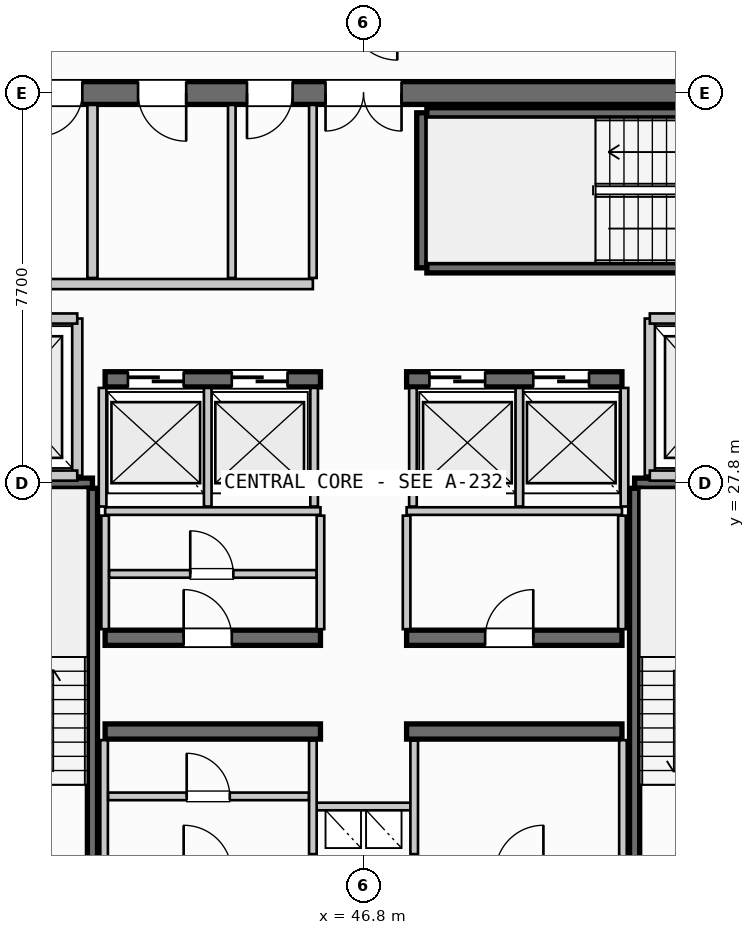
"""IFC4 building model, lengths in metres.
Left out: names, types, materials, properties, quantities, classifications, styles, units other than length and angle.
Written with IfcOpenShell. Run it as: python <this file> out.ifc"""

import sys

from ifc_helpers import new_model, si_unit, direction, frame, frame_2d, origin, place, context, subcontext, project, spatial, rectangle, extrude, source, transform, mapped, element, fill, save


model = new_model("IFC4")
c1 = context("Model", 3, precision=1e-05, world=origin(), true_north=direction((0.0, 1.0)))
c2 = subcontext(c1, "Body", "Model", "MODEL_VIEW")
j1 = project(units=[si_unit("LENGTHUNIT", "METRE"), si_unit("PLANEANGLEUNIT", "RADIAN")], contexts=[c1])
p1 = place(None, origin())
s1 = spatial("IfcSite", under=j1, at=p1, CompositionType="ELEMENT")
p2 = place(p1, origin())
s2 = spatial("IfcBuilding", under=s1, at=p2, CompositionType="ELEMENT")
p3 = place(p2, frame((0.0, 0.0, 231.85)))
s3 = spatial("IfcBuildingStorey", under=s2, at=p3, CompositionType="ELEMENT", Elevation=231.85)
p4 = place(p3, frame((55.6, 35.5, 0.0), z_axis=(0.0, 0.0, 1.0), x_axis=(-1.0, 0.0, 0.0)))
e1 = element("IfcWall", 1, at=p4, inside=s3, PredefinedType="SHEAR", context=c2, shape_type="SweptSolid", body=[
    extrude(rectangle(XDim=17.6, YDim=0.45, at=frame_2d((8.8, 0.0))), origin(), (0.0, 0.0, 1.0), 3.21),
])
p5 = place(p4, frame((8.05, 0.0, 0.0)))
e2 = element("IfcOpeningElement", 2, at=p5, cuts=e1, PredefinedType="OPENING", context=c2, shape_type="SweptSolid", body=[
    extrude(rectangle(XDim=1.5, YDim=2.2, at=frame_2d((0.75, 1.1))), frame((0.0, 0.235, 0.0), z_axis=(0.0, -1.0, 0.0), x_axis=(1.0, 0.0, 0.0)), (0.0, 0.0, 1.0), 0.47),
])
p6 = place(p4, frame((15.85, 0.0, 0.0)))
e3 = element("IfcOpeningElement", 3, at=p6, cuts=e1, PredefinedType="OPENING", context=c2, shape_type="SweptSolid", body=[
    extrude(rectangle(XDim=0.85, YDim=2.15, at=frame_2d((0.425, 1.075))), frame((0.0, 0.235, 0.0), z_axis=(0.0, -1.0, 0.0), x_axis=(1.0, 0.0, 0.0)), (0.0, 0.0, 1.0), 0.47),
])
p7 = place(p4, frame((14.35, 0.0, 0.0)))
e4 = element("IfcOpeningElement", 4, at=p7, cuts=e1, PredefinedType="OPENING", context=c2, shape_type="SweptSolid", body=[
    extrude(rectangle(XDim=0.85, YDim=2.15, at=frame_2d((0.425, 1.075))), frame((0.0, 0.235, 0.0), z_axis=(0.0, -1.0, 0.0), x_axis=(1.0, 0.0, 0.0)), (0.0, 0.0, 1.0), 0.47),
])
p8 = place(p4, frame((12.3, 0.0, 0.0)))
e5 = element("IfcOpeningElement", 5, at=p8, cuts=e1, PredefinedType="OPENING", context=c2, shape_type="SweptSolid", body=[
    extrude(rectangle(XDim=0.95, YDim=2.15, at=frame_2d((0.475, 1.075))), frame((0.0, 0.235, 0.0), z_axis=(0.0, -1.0, 0.0), x_axis=(1.0, 0.0, 0.0)), (0.0, 0.0, 1.0), 0.47),
])
p9 = place(p4, frame((10.2, 0.0, 0.0)))
e6 = element("IfcOpeningElement", 6, at=p9, cuts=e1, PredefinedType="OPENING", context=c2, shape_type="SweptSolid", body=[
    extrude(rectangle(XDim=0.9, YDim=2.15, at=frame_2d((0.45, 1.075))), frame((0.0, 0.235, 0.0), z_axis=(0.0, -1.0, 0.0), x_axis=(1.0, 0.0, 0.0)), (0.0, 0.0, 1.0), 0.47),
])
for number, where, z_axis, x_axis in (
    (7, (41.7, 22.9, 0.0), (0.0, 0.0, 1.0), (1.0, 0.0, 0.0)),
    (8, (47.65, 22.9, 0.0), (0.0, 0.0, 1.0), (1.0, 0.0, 0.0)),
):
    element("IfcWall", number, at=place(p3, frame(where, z_axis=z_axis, x_axis=x_axis)), inside=s3, PredefinedType="SHEAR", context=c2, shape_type="SweptSolid", body=[
        extrude(rectangle(XDim=4.25, YDim=0.3, at=frame_2d((2.125, 0.0))), origin(), (0.0, 0.0, 1.0), 3.21),
    ])
p10 = place(p3, frame((41.7, 24.75, 0.0), z_axis=(0.0, 0.0, 1.0), x_axis=(1.0, 0.0, 0.0)))
e9 = element("IfcWall", 9, at=p10, inside=s3, PredefinedType="SHEAR", context=c2, shape_type="SweptSolid", body=[
    extrude(rectangle(XDim=4.25, YDim=0.3, at=frame_2d((2.125, 0.0))), origin(), (0.0, 0.0, 1.0), 3.21),
])
p11 = place(p10, frame((1.55, 0.0, 0.0)))
e10 = element("IfcOpeningElement", 10, at=p11, cuts=e9, PredefinedType="OPENING", context=c2, shape_type="SweptSolid", body=[
    extrude(rectangle(XDim=0.95, YDim=2.15, at=frame_2d((0.475, 1.075))), frame((0.0, 0.16, 0.0), z_axis=(0.0, -1.0, 0.0), x_axis=(1.0, 0.0, 0.0)), (0.0, 0.0, 1.0), 0.32),
])
p12 = place(p3, frame((47.65, 24.75, 0.0), z_axis=(0.0, 0.0, 1.0), x_axis=(1.0, 0.0, 0.0)))
e11 = element("IfcWall", 11, at=p12, inside=s3, PredefinedType="SHEAR", context=c2, shape_type="SweptSolid", body=[
    extrude(rectangle(XDim=4.25, YDim=0.3, at=frame_2d((2.125, 0.0))), origin(), (0.0, 0.0, 1.0), 3.21),
])
p13 = place(p12, frame((1.55, 0.0, 0.0)))
e12 = element("IfcOpeningElement", 12, at=p13, cuts=e11, PredefinedType="OPENING", context=c2, shape_type="SweptSolid", body=[
    extrude(rectangle(XDim=0.95, YDim=2.15, at=frame_2d((0.475, 1.075))), frame((0.0, 0.16, 0.0), z_axis=(0.0, -1.0, 0.0), x_axis=(1.0, 0.0, 0.0)), (0.0, 0.0, 1.0), 0.32),
])
p14 = place(p3, frame((41.7, 29.85, 0.0), z_axis=(0.0, 0.0, 1.0), x_axis=(1.0, 0.0, 0.0)))
e13 = element("IfcWall", 13, at=p14, inside=s3, PredefinedType="SHEAR", context=c2, shape_type="SweptSolid", body=[
    extrude(rectangle(XDim=4.25, YDim=0.3, at=frame_2d((2.125, 0.0))), origin(), (0.0, 0.0, 1.0), 3.21),
])
p15 = place(p14, frame((0.45, 0.0, 0.0)))
e14 = element("IfcOpeningElement", 14, at=p15, cuts=e13, PredefinedType="OPENING", context=c2, shape_type="SweptSolid", body=[
    extrude(rectangle(XDim=1.1, YDim=2.2, at=frame_2d((0.55, 1.1))), frame((0.0, 0.16, 0.0), z_axis=(0.0, -1.0, 0.0), x_axis=(1.0, 0.0, 0.0)), (0.0, 0.0, 1.0), 0.32),
])
p16 = place(p14, frame((2.5, 0.0, 0.0)))
e15 = element("IfcOpeningElement", 15, at=p16, cuts=e13, PredefinedType="OPENING", context=c2, shape_type="SweptSolid", body=[
    extrude(rectangle(XDim=1.1, YDim=2.2, at=frame_2d((0.55, 1.1))), frame((0.0, 0.16, 0.0), z_axis=(0.0, -1.0, 0.0), x_axis=(1.0, 0.0, 0.0)), (0.0, 0.0, 1.0), 0.32),
])
p17 = place(p3, frame((47.65, 29.85, 0.0), z_axis=(0.0, 0.0, 1.0), x_axis=(1.0, 0.0, 0.0)))
e16 = element("IfcWall", 16, at=p17, inside=s3, PredefinedType="SHEAR", context=c2, shape_type="SweptSolid", body=[
    extrude(rectangle(XDim=4.25, YDim=0.3, at=frame_2d((2.125, 0.0))), origin(), (0.0, 0.0, 1.0), 3.21),
])
p18 = place(p17, frame((0.45, 0.0, 0.0)))
e17 = element("IfcOpeningElement", 17, at=p18, cuts=e16, PredefinedType="OPENING", context=c2, shape_type="SweptSolid", body=[
    extrude(rectangle(XDim=1.1, YDim=2.2, at=frame_2d((0.55, 1.1))), frame((0.0, 0.16, 0.0), z_axis=(0.0, -1.0, 0.0), x_axis=(1.0, 0.0, 0.0)), (0.0, 0.0, 1.0), 0.32),
])
p19 = place(p17, frame((2.5, 0.0, 0.0)))
e18 = element("IfcOpeningElement", 18, at=p19, cuts=e16, PredefinedType="OPENING", context=c2, shape_type="SweptSolid", body=[
    extrude(rectangle(XDim=1.1, YDim=2.2, at=frame_2d((0.55, 1.1))), frame((0.0, 0.16, 0.0), z_axis=(0.0, -1.0, 0.0), x_axis=(1.0, 0.0, 0.0)), (0.0, 0.0, 1.0), 0.32),
])
p20 = place(p3, frame((38.39, 27.8, 0.0), z_axis=(0.0, 0.0, 1.0), x_axis=(1.0, 0.0, 0.0)))
e19 = element("IfcWall", 19, at=p20, inside=s3, PredefinedType="SHEAR", context=c2, shape_type="SweptSolid", body=[
    extrude(rectangle(XDim=3.06, YDim=0.2, at=frame_2d((1.53, 0.0))), origin(), (0.0, 0.0, 1.0), 3.21),
])
p21 = place(p3, frame((41.45, 27.7, 0.0), z_axis=(0.0, 0.0, 1.0), x_axis=(0.0, -1.0, 0.0)))
e20 = element("IfcWall", 20, at=p21, inside=s3, PredefinedType="SHEAR", context=c2, shape_type="SweptSolid", body=[
    extrude(rectangle(XDim=7.35, YDim=0.2, at=frame_2d((3.675, 0.0))), origin(), (0.0, 0.0, 1.0), 3.21),
])
p22 = place(p3, frame((52.15, 27.8, 0.0), z_axis=(0.0, 0.0, 1.0), x_axis=(1.0, 0.0, 0.0)))
e21 = element("IfcWall", 21, at=p22, inside=s3, PredefinedType="SHEAR", context=c2, shape_type="SweptSolid", body=[
    extrude(rectangle(XDim=3.06, YDim=0.2, at=frame_2d((1.53, 0.0))), origin(), (0.0, 0.0, 1.0), 3.21),
])
p23 = place(p3, frame((52.15, 20.35, 0.0), z_axis=(0.0, 0.0, 1.0), x_axis=(0.0, 1.0, 0.0)))
e22 = element("IfcWall", 22, at=p23, inside=s3, PredefinedType="SHEAR", context=c2, shape_type="SweptSolid", body=[
    extrude(rectangle(XDim=7.35, YDim=0.2, at=frame_2d((3.675, 0.0))), origin(), (0.0, 0.0, 1.0), 3.21),
])
p24 = place(p3, frame((47.95, 32.05, 0.0), z_axis=(0.0, 0.0, 1.0), x_axis=(0.0, 1.0, 0.0)))
e23 = element("IfcWall", 23, at=p24, inside=s3, PredefinedType="SHEAR", context=c2, shape_type="SweptSolid", body=[
    extrude(rectangle(XDim=3.06, YDim=0.2, at=frame_2d((1.53, 0.0))), origin(), (0.0, 0.0, 1.0), 3.21),
])
for number, where, z_axis, x_axis in (
    (24, (48.05, 35.11, 0.0), (0.0, 0.0, 1.0), (1.0, 0.0, 0.0)),
    (25, (55.4, 32.05, 0.0), (0.0, 0.0, 1.0), (-1.0, 0.0, 0.0)),
):
    element("IfcWall", number, at=place(p3, frame(where, z_axis=z_axis, x_axis=x_axis)), inside=s3, PredefinedType="SHEAR", context=c2, shape_type="SweptSolid", body=[
        extrude(rectangle(XDim=7.35, YDim=0.2, at=frame_2d((3.675, 0.0))), origin(), (0.0, 0.0, 1.0), 3.21),
    ])
p25 = place(p3, frame((45.8, 21.42, 0.0), z_axis=(0.0, 0.0, 1.0), x_axis=(1.0, 0.0, 0.0)))
e26 = element("IfcWall", 26, at=p25, inside=s3, PredefinedType="PARTITIONING", context=c2, shape_type="SweptSolid", body=[
    extrude(rectangle(XDim=2.0, YDim=0.15, at=frame_2d((1.0, 0.0))), origin(), (0.0, 0.0, 1.0), 2.28),
])
for number, where, z_axis, x_axis in (
    (27, (45.8, 20.48, 0.0), (0.0, 0.0, 1.0), (0.0, 1.0, 0.0)),
    (28, (47.8, 20.48, 0.0), (0.0, 0.0, 1.0), (0.0, 1.0, 0.0)),
):
    element("IfcWall", number, at=place(p3, frame(where, z_axis=z_axis, x_axis=x_axis)), inside=s3, PredefinedType="PARTITIONING", context=c2, shape_type="SweptSolid", body=[
        extrude(rectangle(XDim=2.24, YDim=0.15, at=frame_2d((1.12, 0.0))), origin(), (0.0, 0.0, 1.0), 2.28),
    ])
p26 = place(p3, frame((41.15, 27.95, 0.0), z_axis=(0.0, 0.0, 1.0), x_axis=(0.0, 1.0, 0.0)))
e29 = element("IfcWall", 29, at=p26, inside=s3, PredefinedType="PARTITIONING", context=c2, shape_type="SweptSolid", body=[
    extrude(rectangle(XDim=3.1, YDim=0.2, at=frame_2d((1.55, 0.0))), origin(), (0.0, 0.0, 1.0), 2.28),
])
for number, where, z_axis, x_axis in (
    (30, (38.235, 27.95, 0.0), (0.0, 0.0, 1.0), (1.0, 0.0, 0.0)),
    (31, (38.235, 31.05, 0.0), (0.0, 0.0, 1.0), (1.0, 0.0, 0.0)),
):
    element("IfcWall", number, at=place(p3, frame(where, z_axis=z_axis, x_axis=x_axis)), inside=s3, PredefinedType="PARTITIONING", context=c2, shape_type="SweptSolid", body=[
        extrude(rectangle(XDim=2.915, YDim=0.2, at=frame_2d((1.458, 0.0))), origin(), (0.0, 0.0, 1.0), 2.28),
    ])
p27 = place(p3, frame((52.45, 27.95, 0.0), z_axis=(0.0, 0.0, 1.0), x_axis=(0.0, 1.0, 0.0)))
e32 = element("IfcWall", 32, at=p27, inside=s3, PredefinedType="PARTITIONING", context=c2, shape_type="SweptSolid", body=[
    extrude(rectangle(XDim=3.1, YDim=0.2, at=frame_2d((1.55, 0.0))), origin(), (0.0, 0.0, 1.0), 2.28),
])
for number, where, z_axis, x_axis in (
    (33, (52.45, 27.95, 0.0), (0.0, 0.0, 1.0), (1.0, 0.0, 0.0)),
    (34, (52.45, 31.05, 0.0), (0.0, 0.0, 1.0), (1.0, 0.0, 0.0)),
):
    element("IfcWall", number, at=place(p3, frame(where, z_axis=z_axis, x_axis=x_axis)), inside=s3, PredefinedType="PARTITIONING", context=c2, shape_type="SweptSolid", body=[
        extrude(rectangle(XDim=2.915, YDim=0.2, at=frame_2d((1.458, 0.0))), origin(), (0.0, 0.0, 1.0), 2.28),
    ])
for number, where, z_axis, x_axis in (
    (35, (41.68, 20.335, 0.0), (0.0, 0.0, 1.0), (0.0, 1.0, 0.0)),
    (36, (51.92, 20.335, 0.0), (0.0, 0.0, 1.0), (0.0, 1.0, 0.0)),
):
    element("IfcWall", number, at=place(p3, frame(where, z_axis=z_axis, x_axis=x_axis)), inside=s3, PredefinedType="PARTITIONING", context=c2, shape_type="SweptSolid", body=[
        extrude(rectangle(XDim=2.395, YDim=0.15, at=frame_2d((1.198, 0.0))), origin(), (0.0, 0.0, 1.0), 2.28),
    ])
p28 = place(p3, frame((41.76, 21.62, 0.0), z_axis=(0.0, 0.0, 1.0), x_axis=(1.0, 0.0, 0.0)))
e37 = element("IfcWall", 37, at=p28, inside=s3, PredefinedType="PARTITIONING", context=c2, shape_type="SweptSolid", body=[
    extrude(rectangle(XDim=3.96, YDim=0.15, at=frame_2d((1.98, 0.0))), origin(), (0.0, 0.0, 1.0), 2.28),
])
p29 = place(p28, frame((1.55, 0.0, 0.0)))
e38 = element("IfcOpeningElement", 38, at=p29, cuts=e37, PredefinedType="OPENING", context=c2, shape_type="SweptSolid", body=[
    extrude(rectangle(XDim=0.85, YDim=2.15, at=frame_2d((0.425, 1.075))), frame((0.0, 0.085, 0.0), z_axis=(0.0, -1.0, 0.0), x_axis=(1.0, 0.0, 0.0)), (0.0, 0.0, 1.0), 0.17),
])
for number, where, z_axis, x_axis in (
    (39, (41.7, 27.25, 0.0), (0.0, 0.0, 1.0), (1.0, 0.0, 0.0)),
    (40, (47.65, 27.25, 0.0), (0.0, 0.0, 1.0), (1.0, 0.0, 0.0)),
):
    element("IfcWall", number, at=place(p3, frame(where, z_axis=z_axis, x_axis=x_axis)), inside=s3, PredefinedType="PARTITIONING", context=c2, shape_type="SweptSolid", body=[
        extrude(rectangle(XDim=4.25, YDim=0.15, at=frame_2d((2.125, 0.0))), origin(), (0.0, 0.0, 1.0), 2.28),
    ])
for number, where, z_axis, x_axis in (
    (41, (41.7, 24.92, 0.0), (0.0, 0.0, 1.0), (0.0, 1.0, 0.0)),
    (42, (45.95, 24.92, 0.0), (0.0, 0.0, 1.0), (0.0, 1.0, 0.0)),
    (43, (47.65, 24.92, 0.0), (0.0, 0.0, 1.0), (0.0, 1.0, 0.0)),
    (44, (51.9, 24.92, 0.0), (0.0, 0.0, 1.0), (0.0, 1.0, 0.0)),
):
    element("IfcWall", number, at=place(p3, frame(where, z_axis=z_axis, x_axis=x_axis)), inside=s3, PredefinedType="PARTITIONING", context=c2, shape_type="SweptSolid", body=[
        extrude(rectangle(XDim=2.24, YDim=0.15, at=frame_2d((1.12, 0.0))), origin(), (0.0, 0.0, 1.0), 2.28),
    ])
p30 = place(p3, frame((41.78, 26.01, 0.0), z_axis=(0.0, 0.0, 1.0), x_axis=(1.0, 0.0, 0.0)))
e45 = element("IfcWall", 45, at=p30, inside=s3, PredefinedType="PARTITIONING", context=c2, shape_type="SweptSolid", body=[
    extrude(rectangle(XDim=4.09, YDim=0.15, at=frame_2d((2.045, 0.0))), origin(), (0.0, 0.0, 1.0), 2.28),
])
p31 = place(p30, frame((1.6, 0.0, 0.0)))
e46 = element("IfcOpeningElement", 46, at=p31, cuts=e45, PredefinedType="OPENING", context=c2, shape_type="SweptSolid", body=[
    extrude(rectangle(XDim=0.85, YDim=2.15, at=frame_2d((0.425, 1.075))), frame((0.0, 0.085, 0.0), z_axis=(0.0, -1.0, 0.0), x_axis=(1.0, 0.0, 0.0)), (0.0, 0.0, 1.0), 0.17),
])
for number, where, z_axis, x_axis in (
    (47, (41.65, 27.34, 0.0), (0.0, 0.0, 1.0), (0.0, 1.0, 0.0)),
    (48, (43.725, 27.34, 0.0), (0.0, 0.0, 1.0), (0.0, 1.0, 0.0)),
    (49, (45.825, 27.34, 0.0), (0.0, 0.0, 1.0), (0.0, 1.0, 0.0)),
    (50, (47.775, 27.34, 0.0), (0.0, 0.0, 1.0), (0.0, 1.0, 0.0)),
    (51, (49.875, 27.34, 0.0), (0.0, 0.0, 1.0), (0.0, 1.0, 0.0)),
    (52, (51.95, 27.34, 0.0), (0.0, 0.0, 1.0), (0.0, 1.0, 0.0)),
):
    element("IfcWall", number, at=place(p3, frame(where, z_axis=z_axis, x_axis=x_axis)), inside=s3, PredefinedType="PARTITIONING", context=c2, shape_type="SweptSolid", body=[
        extrude(rectangle(XDim=2.34, YDim=0.15, at=frame_2d((1.17, 0.0))), origin(), (0.0, 0.0, 1.0), 2.28),
    ])
p32 = place(p3, frame((41.45, 31.85, 0.0), z_axis=(0.0, 0.0, 1.0), x_axis=(0.0, 1.0, 0.0)))
e53 = element("IfcWall", 53, at=p32, inside=s3, PredefinedType="PARTITIONING", context=c2, shape_type="SweptSolid", body=[
    extrude(rectangle(XDim=3.415, YDim=0.2, at=frame_2d((1.708, 0.0))), origin(), (0.0, 0.0, 1.0), 2.28),
])
p33 = place(p3, frame((38.235, 31.73, 0.0), z_axis=(0.0, 0.0, 1.0), x_axis=(1.0, 0.0, 0.0)))
e54 = element("IfcWall", 54, at=p33, inside=s3, PredefinedType="PARTITIONING", context=c2, shape_type="SweptSolid", body=[
    extrude(rectangle(XDim=7.565, YDim=0.2, at=frame_2d((3.782, 0.0))), origin(), (0.0, 0.0, 1.0), 2.28),
])
p34 = place(p3, frame((45.8, 31.85, 0.0), z_axis=(0.0, 0.0, 1.0), x_axis=(0.0, 1.0, 0.0)))
e55 = element("IfcWall", 55, at=p34, inside=s3, PredefinedType="PARTITIONING", context=c2, shape_type="SweptSolid", body=[
    extrude(rectangle(XDim=3.415, YDim=0.15, at=frame_2d((1.708, 0.0))), origin(), (0.0, 0.0, 1.0), 2.28),
])
p35 = place(p3, frame((44.2, 31.85, 0.0), z_axis=(0.0, 0.0, 1.0), x_axis=(0.0, 1.0, 0.0)))
e56 = element("IfcWall", 56, at=p35, inside=s3, PredefinedType="PLUMBINGWALL", context=c2, shape_type="SweptSolid", body=[
    extrude(rectangle(XDim=3.415, YDim=0.15, at=frame_2d((1.708, 0.0))), origin(), (0.0, 0.0, 1.0), 2.28),
])
m1 = source(origin(), c2, "Body", "SweptSolid", [
    extrude(rectangle(XDim=1.5, YDim=2.2, at=frame_2d((0.75, 1.1))), frame((0.0, 0.025, 0.0), z_axis=(0.0, -1.0, 0.0), x_axis=(1.0, 0.0, 0.0)), (0.0, 0.0, 1.0), 0.05),
])
p36 = place(p5, origin())
e57 = element("IfcDoor", 57, at=p36, inside=s3, OperationType="DOUBLE_DOOR_SINGLE_SWING", PredefinedType="DOOR", context=c2, shape_type="MappedRepresentation", body=[
    mapped(m1, transform((0.0, 0.0, 0.0), scale=1.0)),
])
fill(e2, e57)
m2 = source(origin(), c2, "Body", "SweptSolid", [
    extrude(rectangle(XDim=0.95, YDim=2.15, at=frame_2d((0.475, 1.075))), frame((0.0, 0.025, 0.0), z_axis=(0.0, -1.0, 0.0), x_axis=(1.0, 0.0, 0.0)), (0.0, 0.0, 1.0), 0.05),
])
p37 = place(p11, origin())
e58 = element("IfcDoor", 58, at=p37, inside=s3, OperationType="SINGLE_SWING_LEFT", PredefinedType="DOOR", context=c2, shape_type="MappedRepresentation", body=[
    mapped(m2, transform((0.0, 0.0, 0.0), scale=1.0)),
])
fill(e10, e58)
p38 = place(p13, origin())
e59 = element("IfcDoor", 59, at=p38, inside=s3, OperationType="SINGLE_SWING_RIGHT", PredefinedType="DOOR", context=c2, shape_type="MappedRepresentation", body=[
    mapped(m2, transform((0.0, 0.0, 0.0), scale=1.0)),
])
fill(e12, e59)
m3 = source(origin(), c2, "Body", "SweptSolid", [
    extrude(rectangle(XDim=1.1, YDim=2.2, at=frame_2d((0.55, 1.1))), frame((0.0, 0.025, 0.0), z_axis=(0.0, -1.0, 0.0), x_axis=(1.0, 0.0, 0.0)), (0.0, 0.0, 1.0), 0.05),
])
p39 = place(p15, origin())
e60 = element("IfcDoor", 60, at=p39, inside=s3, OperationType="SLIDING_TO_LEFT", PredefinedType="DOOR", context=c2, shape_type="MappedRepresentation", body=[
    mapped(m3, transform((0.0, 0.0, 0.0), scale=1.0)),
])
fill(e14, e60)
p40 = place(p16, origin())
e61 = element("IfcDoor", 61, at=p40, inside=s3, OperationType="SLIDING_TO_LEFT", PredefinedType="DOOR", context=c2, shape_type="MappedRepresentation", body=[
    mapped(m3, transform((0.0, 0.0, 0.0), scale=1.0)),
])
fill(e15, e61)
p41 = place(p18, origin())
e62 = element("IfcDoor", 62, at=p41, inside=s3, OperationType="SLIDING_TO_LEFT", PredefinedType="DOOR", context=c2, shape_type="MappedRepresentation", body=[
    mapped(m3, transform((0.0, 0.0, 0.0), scale=1.0)),
])
fill(e17, e62)
p42 = place(p19, origin())
e63 = element("IfcDoor", 63, at=p42, inside=s3, OperationType="SLIDING_TO_LEFT", PredefinedType="DOOR", context=c2, shape_type="MappedRepresentation", body=[
    mapped(m3, transform((0.0, 0.0, 0.0), scale=1.0)),
])
fill(e18, e63)
m4 = source(origin(), c2, "Body", "SweptSolid", [
    extrude(rectangle(XDim=0.85, YDim=2.15, at=frame_2d((0.425, 1.075))), frame((0.0, 0.025, 0.0), z_axis=(0.0, -1.0, 0.0), x_axis=(1.0, 0.0, 0.0)), (0.0, 0.0, 1.0), 0.05),
])
p43 = place(p7, origin())
e64 = element("IfcDoor", 64, at=p43, inside=s3, OperationType="SINGLE_SWING_RIGHT", PredefinedType="DOOR", context=c2, shape_type="MappedRepresentation", body=[
    mapped(m4, transform((0.0, 0.0, 0.0), scale=1.0)),
])
fill(e4, e64)
p44 = place(p8, origin())
e65 = element("IfcDoor", 65, at=p44, inside=s3, OperationType="SINGLE_SWING_LEFT", PredefinedType="DOOR", context=c2, shape_type="MappedRepresentation", body=[
    mapped(m2, transform((0.0, 0.0, 0.0), scale=1.0)),
])
fill(e5, e65)
m5 = source(origin(), c2, "Body", "SweptSolid", [
    extrude(rectangle(XDim=0.9, YDim=2.15, at=frame_2d((0.45, 1.075))), frame((0.0, 0.025, 0.0), z_axis=(0.0, -1.0, 0.0), x_axis=(1.0, 0.0, 0.0)), (0.0, 0.0, 1.0), 0.05),
])
p45 = place(p9, origin())
e66 = element("IfcDoor", 66, at=p45, inside=s3, OperationType="SINGLE_SWING_RIGHT", PredefinedType="DOOR", context=c2, shape_type="MappedRepresentation", body=[
    mapped(m5, transform((0.0, 0.0, 0.0), scale=1.0)),
])
fill(e6, e66)
p46 = place(p29, origin())
e67 = element("IfcDoor", 67, at=p46, inside=s3, OperationType="SINGLE_SWING_LEFT", PredefinedType="DOOR", context=c2, shape_type="MappedRepresentation", body=[
    mapped(m4, transform((0.0, 0.0, 0.0), scale=1.0)),
])
fill(e38, e67)
p47 = place(p31, origin())
e68 = element("IfcDoor", 68, at=p47, inside=s3, OperationType="SINGLE_SWING_LEFT", PredefinedType="DOOR", context=c2, shape_type="MappedRepresentation", body=[
    mapped(m4, transform((0.0, 0.0, 0.0), scale=1.0)),
])
fill(e46, e68)
save(model, sys.argv[1])
